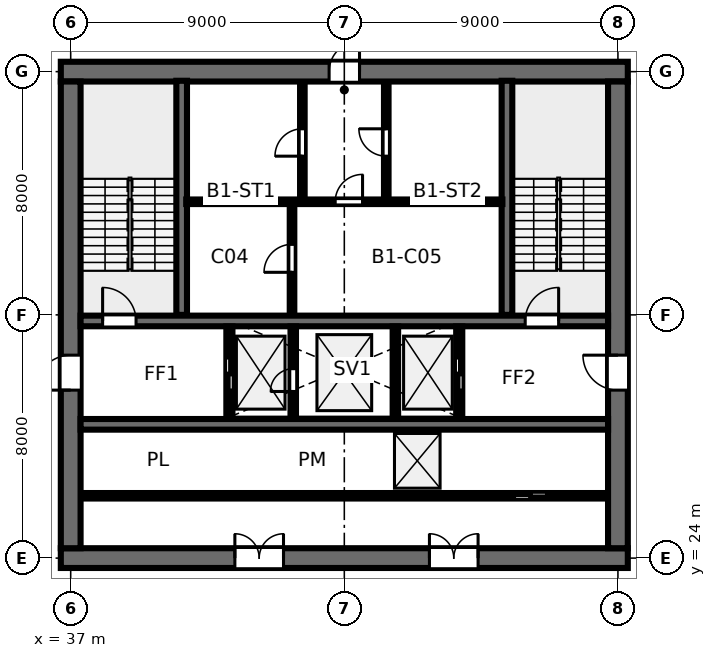
"""IFC4 building model, lengths in metres.
Left out: names, types, materials, properties, quantities, classifications, styles, units other than length and angle.
Written with IfcOpenShell. Run it as: python <this file> out.ifc"""

import sys

from ifc_helpers import new_model, si_unit, direction, frame, frame_2d, origin, place, context, subcontext, project, spatial, rectangle, extrude, element, fill, save


model = new_model("IFC4")
c1 = context("Model", 3, precision=1e-05, world=origin(), true_north=direction((0.0, 1.0)))
c2 = subcontext(c1, "Body", "Model", "MODEL_VIEW")
j1 = project(units=[si_unit("LENGTHUNIT", "METRE"), si_unit("PLANEANGLEUNIT", "RADIAN")], contexts=[c1])
p1 = place(None, origin())
s1 = spatial("IfcSite", under=j1, at=p1, CompositionType="ELEMENT")
p2 = place(p1, origin())
s2 = spatial("IfcBuilding", under=s1, at=p2, CompositionType="ELEMENT")
p3 = place(p2, frame((0.0, 0.0, -4.2)))
s3 = spatial("IfcBuildingStorey", under=s2, at=p3, CompositionType="ELEMENT", Elevation=-4.2)
p4 = place(p3, frame((36.675, 24.0, 0.0), z_axis=(0.0, 0.0, 1.0), x_axis=(1.0, 0.0, 0.0)))
e1 = element("IfcWall", 1, at=p4, inside=s3, PredefinedType="SHEAR", context=c2, shape_type="SweptSolid", body=[
    extrude(rectangle(XDim=18.65, YDim=0.65, at=frame_2d((9.325, 0.0))), origin(), (0.0, 0.0, 1.0), 3.85),
])
p5 = place(p4, frame((5.725, 0.0, 0.0)))
e2 = element("IfcOpeningElement", 2, at=p5, cuts=e1, PredefinedType="OPENING", context=c2, shape_type="SweptSolid", body=[
    extrude(rectangle(XDim=1.6, YDim=2.15, at=frame_2d((0.8, 1.075))), frame((0.0, 0.335, 0.0), z_axis=(0.0, -1.0, 0.0), x_axis=(1.0, 0.0, 0.0)), (0.0, 0.0, 1.0), 0.67),
])
p6 = place(p4, frame((12.125, 0.0, 0.0)))
e3 = element("IfcOpeningElement", 3, at=p6, cuts=e1, PredefinedType="OPENING", context=c2, shape_type="SweptSolid", body=[
    extrude(rectangle(XDim=1.6, YDim=2.15, at=frame_2d((0.8, 1.075))), frame((0.0, 0.335, 0.0), z_axis=(0.0, -1.0, 0.0), x_axis=(1.0, 0.0, 0.0)), (0.0, 0.0, 1.0), 0.67),
])
p7 = place(p3, frame((36.675, 40.0, 0.0), z_axis=(0.0, 0.0, 1.0), x_axis=(1.0, 0.0, 0.0)))
e4 = element("IfcWall", 4, at=p7, inside=s3, PredefinedType="SHEAR", context=c2, shape_type="SweptSolid", body=[
    extrude(rectangle(XDim=18.65, YDim=0.65, at=frame_2d((9.325, 0.0))), origin(), (0.0, 0.0, 1.0), 3.85),
])
p8 = place(p7, frame((8.825, 0.0, 0.0)))
e5 = element("IfcOpeningElement", 5, at=p8, cuts=e4, PredefinedType="OPENING", context=c2, shape_type="SweptSolid", body=[
    extrude(rectangle(XDim=1.0, YDim=2.15, at=frame_2d((0.5, 1.075))), frame((0.0, 0.335, 0.0), z_axis=(0.0, -1.0, 0.0), x_axis=(1.0, 0.0, 0.0)), (0.0, 0.0, 1.0), 0.67),
])
p9 = place(p3, frame((37.0, 24.325, 0.0), z_axis=(0.0, 0.0, 1.0), x_axis=(0.0, 1.0, 0.0)))
e6 = element("IfcWall", 6, at=p9, inside=s3, PredefinedType="SHEAR", context=c2, shape_type="SweptSolid", body=[
    extrude(rectangle(XDim=15.35, YDim=0.65, at=frame_2d((7.675, 0.0))), origin(), (0.0, 0.0, 1.0), 3.85),
])
p10 = place(p9, frame((5.2, 0.0, 0.0)))
e7 = element("IfcOpeningElement", 7, at=p10, cuts=e6, PredefinedType="OPENING", context=c2, shape_type="SweptSolid", body=[
    extrude(rectangle(XDim=1.15, YDim=2.15, at=frame_2d((0.575, 1.075))), frame((0.0, 0.335, 0.0), z_axis=(0.0, -1.0, 0.0), x_axis=(1.0, 0.0, 0.0)), (0.0, 0.0, 1.0), 0.67),
])
p11 = place(p3, frame((55.0, 24.325, 0.0), z_axis=(0.0, 0.0, 1.0), x_axis=(0.0, 1.0, 0.0)))
e8 = element("IfcWall", 8, at=p11, inside=s3, PredefinedType="SHEAR", context=c2, shape_type="SweptSolid", body=[
    extrude(rectangle(XDim=15.35, YDim=0.65, at=frame_2d((7.675, 0.0))), origin(), (0.0, 0.0, 1.0), 3.85),
])
p12 = place(p11, frame((5.2, 0.0, 0.0)))
e9 = element("IfcOpeningElement", 9, at=p12, cuts=e8, PredefinedType="OPENING", context=c2, shape_type="SweptSolid", body=[
    extrude(rectangle(XDim=1.15, YDim=2.15, at=frame_2d((0.575, 1.075))), frame((0.0, 0.335, 0.0), z_axis=(0.0, -1.0, 0.0), x_axis=(1.0, 0.0, 0.0)), (0.0, 0.0, 1.0), 0.67),
])
p13 = place(p3, frame((37.325, 31.8, 0.0), z_axis=(0.0, 0.0, 1.0), x_axis=(1.0, 0.0, 0.0)))
e10 = element("IfcWall", 10, at=p13, inside=s3, PredefinedType="SHEAR", context=c2, shape_type="SweptSolid", body=[
    extrude(rectangle(XDim=17.35, YDim=0.35, at=frame_2d((8.675, 0.0))), origin(), (0.0, 0.0, 1.0), 3.85),
])
p14 = place(p13, frame((0.725, 0.0, 0.0)))
e11 = element("IfcOpeningElement", 11, at=p14, cuts=e10, PredefinedType="OPENING", context=c2, shape_type="SweptSolid", body=[
    extrude(rectangle(XDim=1.1, YDim=2.15, at=frame_2d((0.55, 1.075))), frame((0.0, 0.185, 0.0), z_axis=(0.0, -1.0, 0.0), x_axis=(1.0, 0.0, 0.0)), (0.0, 0.0, 1.0), 0.37),
])
p15 = place(p13, frame((14.625, 0.0, 0.0)))
e12 = element("IfcOpeningElement", 12, at=p15, cuts=e10, PredefinedType="OPENING", context=c2, shape_type="SweptSolid", body=[
    extrude(rectangle(XDim=1.1, YDim=2.15, at=frame_2d((0.55, 1.075))), frame((0.0, 0.185, 0.0), z_axis=(0.0, -1.0, 0.0), x_axis=(1.0, 0.0, 0.0)), (0.0, 0.0, 1.0), 0.37),
])
p16 = place(p3, frame((37.325, 28.4, 0.0), z_axis=(0.0, 0.0, 1.0), x_axis=(1.0, 0.0, 0.0)))
e13 = element("IfcWall", 13, at=p16, inside=s3, PredefinedType="SHEAR", context=c2, shape_type="SweptSolid", body=[
    extrude(rectangle(XDim=17.35, YDim=0.35, at=frame_2d((8.675, 0.0))), origin(), (0.0, 0.0, 1.0), 3.85),
])
for number, where, z_axis, x_axis in (
    (14, (40.65, 32.0, 0.0), (0.0, 0.0, 1.0), (0.0, 1.0, 0.0)),
    (15, (51.35, 32.0, 0.0), (0.0, 0.0, 1.0), (0.0, 1.0, 0.0)),
):
    element("IfcWall", number, at=place(p3, frame(where, z_axis=z_axis, x_axis=x_axis)), inside=s3, PredefinedType="SHEAR", context=c2, shape_type="SweptSolid", body=[
        extrude(rectangle(XDim=7.7, YDim=0.35, at=frame_2d((3.85, 0.0))), origin(), (0.0, 0.0, 1.0), 4.2),
    ])
p17 = place(p3, frame((44.62, 35.72, 0.0), z_axis=(0.0, 0.0, 1.0), x_axis=(0.0, 1.0, 0.0)))
e16 = element("IfcWall", 16, at=p17, inside=s3, PredefinedType="PARTITIONING", context=c2, shape_type="SweptSolid", body=[
    extrude(rectangle(XDim=3.93, YDim=0.15, at=frame_2d((1.965, 0.0))), origin(), (0.0, 0.0, 1.0), 3.85),
])
p18 = place(p17, frame((1.5, 0.0, 0.0)))
e17 = element("IfcOpeningElement", 17, at=p18, cuts=e16, PredefinedType="OPENING", context=c2, shape_type="SweptSolid", body=[
    extrude(rectangle(XDim=0.9, YDim=2.15, at=frame_2d((0.45, 1.075))), frame((0.0, 0.085, 0.0), z_axis=(0.0, -1.0, 0.0), x_axis=(1.0, 0.0, 0.0)), (0.0, 0.0, 1.0), 0.17),
])
p19 = place(p3, frame((47.38, 35.72, 0.0), z_axis=(0.0, 0.0, 1.0), x_axis=(0.0, 1.0, 0.0)))
e18 = element("IfcWall", 18, at=p19, inside=s3, PredefinedType="PARTITIONING", context=c2, shape_type="SweptSolid", body=[
    extrude(rectangle(XDim=3.93, YDim=0.15, at=frame_2d((1.965, 0.0))), origin(), (0.0, 0.0, 1.0), 3.85),
])
p20 = place(p19, frame((1.5, 0.0, 0.0)))
e19 = element("IfcOpeningElement", 19, at=p20, cuts=e18, PredefinedType="OPENING", context=c2, shape_type="SweptSolid", body=[
    extrude(rectangle(XDim=0.9, YDim=2.15, at=frame_2d((0.45, 1.075))), frame((0.0, 0.085, 0.0), z_axis=(0.0, -1.0, 0.0), x_axis=(1.0, 0.0, 0.0)), (0.0, 0.0, 1.0), 0.17),
])
p21 = place(p3, frame((44.28, 32.05, 0.0), z_axis=(0.0, 0.0, 1.0), x_axis=(0.0, 1.0, 0.0)))
e20 = element("IfcWall", 20, at=p21, inside=s3, PredefinedType="PARTITIONING", context=c2, shape_type="SweptSolid", body=[
    extrude(rectangle(XDim=3.67, YDim=0.15, at=frame_2d((1.835, 0.0))), origin(), (0.0, 0.0, 1.0), 3.85),
])
p22 = place(p21, frame((1.35, 0.0, 0.0)))
e21 = element("IfcOpeningElement", 21, at=p22, cuts=e20, PredefinedType="OPENING", context=c2, shape_type="SweptSolid", body=[
    extrude(rectangle(XDim=0.92, YDim=2.15, at=frame_2d((0.46, 1.075))), frame((0.0, 0.085, 0.0), z_axis=(0.0, -1.0, 0.0), x_axis=(1.0, 0.0, 0.0)), (0.0, 0.0, 1.0), 0.17),
])
p23 = place(p3, frame((40.8, 35.72, 0.0), z_axis=(0.0, 0.0, 1.0), x_axis=(1.0, 0.0, 0.0)))
e22 = element("IfcWall", 22, at=p23, inside=s3, PredefinedType="PARTITIONING", context=c2, shape_type="SweptSolid", body=[
    extrude(rectangle(XDim=10.4, YDim=0.15, at=frame_2d((5.2, 0.0))), origin(), (0.0, 0.0, 1.0), 3.85),
])
p24 = place(p23, frame((4.9, 0.0, 0.0)))
e23 = element("IfcOpeningElement", 23, at=p24, cuts=e22, PredefinedType="OPENING", context=c2, shape_type="SweptSolid", body=[
    extrude(rectangle(XDim=0.9, YDim=2.15, at=frame_2d((0.45, 1.075))), frame((0.0, 0.085, 0.0), z_axis=(0.0, -1.0, 0.0), x_axis=(1.0, 0.0, 0.0)), (0.0, 0.0, 1.0), 0.17),
])
p25 = place(p3, frame((42.22, 28.58, 0.0), z_axis=(0.0, 0.0, 1.0), x_axis=(0.0, 1.0, 0.0)))
e24 = element("IfcWall", 24, at=p25, inside=s3, PredefinedType="PARTITIONING", context=c2, shape_type="SweptSolid", body=[
    extrude(rectangle(XDim=3.04, YDim=0.2, at=frame_2d((1.52, 0.0))), origin(), (0.0, 0.0, 1.0), 3.85),
])
p26 = place(p25, frame((0.95, 0.0, 0.0)))
e25 = element("IfcOpeningElement", 25, at=p26, cuts=e24, PredefinedType="OPENING", context=c2, shape_type="SweptSolid", body=[
    extrude(rectangle(XDim=1.05, YDim=2.15, at=frame_2d((0.525, 1.075))), frame((0.0, 0.11, 0.0), z_axis=(0.0, -1.0, 0.0), x_axis=(1.0, 0.0, 0.0)), (0.0, 0.0, 1.0), 0.22),
])
p27 = place(p3, frame((49.78, 28.58, 0.0), z_axis=(0.0, 0.0, 1.0), x_axis=(0.0, 1.0, 0.0)))
e26 = element("IfcWall", 26, at=p27, inside=s3, PredefinedType="PARTITIONING", context=c2, shape_type="SweptSolid", body=[
    extrude(rectangle(XDim=3.04, YDim=0.2, at=frame_2d((1.52, 0.0))), origin(), (0.0, 0.0, 1.0), 3.85),
])
p28 = place(p27, frame((0.95, 0.0, 0.0)))
e27 = element("IfcOpeningElement", 27, at=p28, cuts=e26, PredefinedType="OPENING", context=c2, shape_type="SweptSolid", body=[
    extrude(rectangle(XDim=1.05, YDim=2.15, at=frame_2d((0.525, 1.075))), frame((0.0, 0.11, 0.0), z_axis=(0.0, -1.0, 0.0), x_axis=(1.0, 0.0, 0.0)), (0.0, 0.0, 1.0), 0.22),
])
p29 = place(p3, frame((44.32, 28.58, 0.0), z_axis=(0.0, 0.0, 1.0), x_axis=(0.0, 1.0, 0.0)))
e28 = element("IfcWall", 28, at=p29, inside=s3, PredefinedType="PARTITIONING", context=c2, shape_type="SweptSolid", body=[
    extrude(rectangle(XDim=3.04, YDim=0.18, at=frame_2d((1.52, 0.0))), origin(), (0.0, 0.0, 1.0), 3.85),
])
p30 = place(p29, frame((0.9, 0.0, 0.0)))
e29 = element("IfcOpeningElement", 29, at=p30, cuts=e28, PredefinedType="OPENING", context=c2, shape_type="SweptSolid", body=[
    extrude(rectangle(XDim=0.75, YDim=2.0, at=frame_2d((0.375, 1.0))), frame((0.0, 0.1, 0.0), z_axis=(0.0, -1.0, 0.0), x_axis=(1.0, 0.0, 0.0)), (0.0, 0.0, 1.0), 0.2),
])
p31 = place(p3, frame((47.68, 28.58, 0.0), z_axis=(0.0, 0.0, 1.0), x_axis=(0.0, 1.0, 0.0)))
e30 = element("IfcWall", 30, at=p31, inside=s3, PredefinedType="PARTITIONING", context=c2, shape_type="SweptSolid", body=[
    extrude(rectangle(XDim=3.04, YDim=0.18, at=frame_2d((1.52, 0.0))), origin(), (0.0, 0.0, 1.0), 3.85),
])
p32 = place(p3, frame((37.4, 26.05, 0.0), z_axis=(0.0, 0.0, 1.0), x_axis=(1.0, 0.0, 0.0)))
e31 = element("IfcWall", 31, at=p32, inside=s3, PredefinedType="PARTITIONING", context=c2, shape_type="SweptSolid", body=[
    extrude(rectangle(XDim=17.2, YDim=0.18, at=frame_2d((8.6, 0.0))), origin(), (0.0, 0.0, 1.0), 3.85),
])
p33 = place(p32, frame((14.2, 0.0, 0.0)))
e32 = element("IfcOpeningElement", 32, at=p33, cuts=e31, PredefinedType="OPENING", context=c2, shape_type="SweptSolid", body=[
    extrude(rectangle(XDim=1.05, YDim=2.15, at=frame_2d((0.525, 1.075))), frame((0.0, 0.1, 0.0), z_axis=(0.0, -1.0, 0.0), x_axis=(1.0, 0.0, 0.0)), (0.0, 0.0, 1.0), 0.2),
])
p34 = place(p14, origin())
e33 = element("IfcDoor", 33, at=p34, inside=s3, OperationType="SINGLE_SWING_LEFT", PredefinedType="DOOR", context=c2, shape_type="SweptSolid", body=[
    extrude(rectangle(XDim=1.1, YDim=2.15, at=frame_2d((0.55, 1.075))), frame((0.0, 0.025, 0.0), z_axis=(0.0, -1.0, 0.0), x_axis=(1.0, 0.0, 0.0)), (0.0, 0.0, 1.0), 0.05),
])
fill(e11, e33)
p35 = place(p15, origin())
e34 = element("IfcDoor", 34, at=p35, inside=s3, OperationType="SINGLE_SWING_RIGHT", PredefinedType="DOOR", context=c2, shape_type="SweptSolid", body=[
    extrude(rectangle(XDim=1.1, YDim=2.15, at=frame_2d((0.55, 1.075))), frame((0.0, 0.025, 0.0), z_axis=(0.0, -1.0, 0.0), x_axis=(1.0, 0.0, 0.0)), (0.0, 0.0, 1.0), 0.05),
])
fill(e12, e34)
p36 = place(p8, origin())
e35 = element("IfcDoor", 35, at=p36, inside=s3, OperationType="SINGLE_SWING_RIGHT", PredefinedType="DOOR", context=c2, shape_type="SweptSolid", body=[
    extrude(rectangle(XDim=1.0, YDim=2.15, at=frame_2d((0.5, 1.075))), frame((0.0, 0.025, 0.0), z_axis=(0.0, -1.0, 0.0), x_axis=(1.0, 0.0, 0.0)), (0.0, 0.0, 1.0), 0.05),
])
fill(e5, e35)
p37 = place(p10, origin())
e36 = element("IfcDoor", 36, at=p37, inside=s3, OperationType="SINGLE_SWING_LEFT", PredefinedType="DOOR", context=c2, shape_type="SweptSolid", body=[
    extrude(rectangle(XDim=1.15, YDim=2.15, at=frame_2d((0.575, 1.075))), frame((0.0, 0.025, 0.0), z_axis=(0.0, -1.0, 0.0), x_axis=(1.0, 0.0, 0.0)), (0.0, 0.0, 1.0), 0.05),
])
fill(e7, e36)
p38 = place(p12, origin())
e37 = element("IfcDoor", 37, at=p38, inside=s3, OperationType="SINGLE_SWING_RIGHT", PredefinedType="DOOR", context=c2, shape_type="SweptSolid", body=[
    extrude(rectangle(XDim=1.15, YDim=2.15, at=frame_2d((0.575, 1.075))), frame((0.0, 0.025, 0.0), z_axis=(0.0, -1.0, 0.0), x_axis=(1.0, 0.0, 0.0)), (0.0, 0.0, 1.0), 0.05),
])
fill(e9, e37)
p39 = place(p5, origin())
e38 = element("IfcDoor", 38, at=p39, inside=s3, OperationType="DOUBLE_DOOR_SINGLE_SWING", PredefinedType="DOOR", context=c2, shape_type="SweptSolid", body=[
    extrude(rectangle(XDim=1.6, YDim=2.15, at=frame_2d((0.8, 1.075))), frame((0.0, 0.025, 0.0), z_axis=(0.0, -1.0, 0.0), x_axis=(1.0, 0.0, 0.0)), (0.0, 0.0, 1.0), 0.05),
])
fill(e2, e38)
p40 = place(p6, origin())
e39 = element("IfcDoor", 39, at=p40, inside=s3, OperationType="DOUBLE_DOOR_SINGLE_SWING", PredefinedType="DOOR", context=c2, shape_type="SweptSolid", body=[
    extrude(rectangle(XDim=1.6, YDim=2.15, at=frame_2d((0.8, 1.075))), frame((0.0, 0.025, 0.0), z_axis=(0.0, -1.0, 0.0), x_axis=(1.0, 0.0, 0.0)), (0.0, 0.0, 1.0), 0.05),
])
fill(e3, e39)
p41 = place(p18, origin())
e40 = element("IfcDoor", 40, at=p41, inside=s3, OperationType="SINGLE_SWING_LEFT", PredefinedType="DOOR", context=c2, shape_type="SweptSolid", body=[
    extrude(rectangle(XDim=0.9, YDim=2.15, at=frame_2d((0.45, 1.075))), frame((0.0, 0.025, 0.0), z_axis=(0.0, -1.0, 0.0), x_axis=(1.0, 0.0, 0.0)), (0.0, 0.0, 1.0), 0.05),
])
fill(e17, e40)
p42 = place(p20, origin())
e41 = element("IfcDoor", 41, at=p42, inside=s3, OperationType="SINGLE_SWING_RIGHT", PredefinedType="DOOR", context=c2, shape_type="SweptSolid", body=[
    extrude(rectangle(XDim=0.9, YDim=2.15, at=frame_2d((0.45, 1.075))), frame((0.0, 0.025, 0.0), z_axis=(0.0, -1.0, 0.0), x_axis=(1.0, 0.0, 0.0)), (0.0, 0.0, 1.0), 0.05),
])
fill(e19, e41)
p43 = place(p22, origin())
e42 = element("IfcDoor", 42, at=p43, inside=s3, OperationType="SINGLE_SWING_LEFT", PredefinedType="DOOR", context=c2, shape_type="SweptSolid", body=[
    extrude(rectangle(XDim=0.92, YDim=2.15, at=frame_2d((0.46, 1.075))), frame((0.0, 0.025, 0.0), z_axis=(0.0, -1.0, 0.0), x_axis=(1.0, 0.0, 0.0)), (0.0, 0.0, 1.0), 0.05),
])
fill(e21, e42)
p44 = place(p24, origin())
e43 = element("IfcDoor", 43, at=p44, inside=s3, OperationType="SINGLE_SWING_RIGHT", PredefinedType="DOOR", context=c2, shape_type="SweptSolid", body=[
    extrude(rectangle(XDim=0.9, YDim=2.15, at=frame_2d((0.45, 1.075))), frame((0.0, 0.025, 0.0), z_axis=(0.0, -1.0, 0.0), x_axis=(1.0, 0.0, 0.0)), (0.0, 0.0, 1.0), 0.05),
])
fill(e23, e43)
p45 = place(p26, origin())
e44 = element("IfcDoor", 44, at=p45, inside=s3, OperationType="SLIDING_TO_LEFT", PredefinedType="DOOR", context=c2, shape_type="SweptSolid", body=[
    extrude(rectangle(XDim=1.05, YDim=2.15, at=frame_2d((0.525, 1.075))), frame((0.0, 0.025, 0.0), z_axis=(0.0, -1.0, 0.0), x_axis=(1.0, 0.0, 0.0)), (0.0, 0.0, 1.0), 0.05),
])
fill(e25, e44)
p46 = place(p28, origin())
e45 = element("IfcDoor", 45, at=p46, inside=s3, OperationType="SLIDING_TO_RIGHT", PredefinedType="DOOR", context=c2, shape_type="SweptSolid", body=[
    extrude(rectangle(XDim=1.05, YDim=2.15, at=frame_2d((0.525, 1.075))), frame((0.0, 0.025, 0.0), z_axis=(0.0, -1.0, 0.0), x_axis=(1.0, 0.0, 0.0)), (0.0, 0.0, 1.0), 0.05),
])
fill(e27, e45)
p47 = place(p33, origin())
e46 = element("IfcDoor", 46, at=p47, inside=s3, OperationType="SLIDING_TO_LEFT", PredefinedType="DOOR", context=c2, shape_type="SweptSolid", body=[
    extrude(rectangle(XDim=1.05, YDim=2.15, at=frame_2d((0.525, 1.075))), frame((0.0, 0.025, 0.0), z_axis=(0.0, -1.0, 0.0), x_axis=(1.0, 0.0, 0.0)), (0.0, 0.0, 1.0), 0.05),
])
fill(e32, e46)
p48 = place(p30, origin())
e47 = element("IfcDoor", 47, at=p48, inside=s3, OperationType="SINGLE_SWING_LEFT", PredefinedType="TRAPDOOR", context=c2, shape_type="SweptSolid", body=[
    extrude(rectangle(XDim=0.75, YDim=2.0, at=frame_2d((0.375, 1.0))), frame((0.0, 0.025, 0.0), z_axis=(0.0, -1.0, 0.0), x_axis=(1.0, 0.0, 0.0)), (0.0, 0.0, 1.0), 0.05),
])
fill(e29, e47)
save(model, sys.argv[1])
